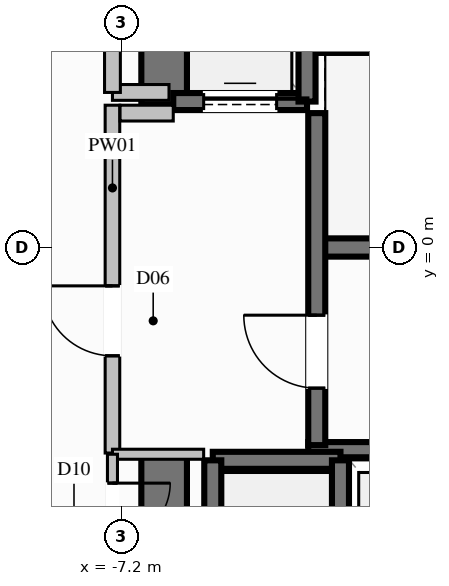
"""IFC4 building model, lengths in metres.
Left out: names, types, materials, properties, quantities, classifications, styles, units other than length and angle.
Written with IfcOpenShell. Run it as: python <this file> out.ifc"""

import sys

from ifc_helpers import new_model, si_unit, direction, frame, frame_2d, origin, place, context, subcontext, project, spatial, rectangle, extrude, element, fill, save


model = new_model("IFC4")
c1 = context("Model", 3, precision=1e-05, world=origin(), true_north=direction((0.0, 1.0)))
c2 = subcontext(c1, "Body", "Model", "MODEL_VIEW")
j1 = project(units=[si_unit("LENGTHUNIT", "METRE"), si_unit("PLANEANGLEUNIT", "RADIAN")], contexts=[c1])
p1 = place(None, origin())
s1 = spatial("IfcSite", under=j1, at=p1, CompositionType="ELEMENT")
p2 = place(p1, origin())
s2 = spatial("IfcBuilding", under=s1, at=p2, CompositionType="ELEMENT")
p3 = place(p2, frame((0.0, 0.0, 68.0)))
s3 = spatial("IfcBuildingStorey", under=s2, at=p3, CompositionType="ELEMENT", Elevation=68.0)
p4 = place(p3, frame((-3.99, 0.0, 0.0), z_axis=(0.0, 0.0, 1.0), x_axis=(1.0, 0.0, 0.0)))
e1 = element("IfcWall", 1, at=p4, inside=s3, PredefinedType="SHEAR", context=c2, shape_type="SweptSolid", body=[
    extrude(rectangle(XDim=7.98, YDim=0.3, at=frame_2d((3.99, 0.0))), origin(), (0.0, 0.0, 1.0), 3.6),
])
for number, where, z_axis, x_axis in (
    (2, (-4.13, -3.325, 0.0), (0.0, 0.0, 1.0), (1.0, 0.0, 0.0)),
    (3, (-4.13, 3.325, 0.0), (0.0, 0.0, 1.0), (1.0, 0.0, 0.0)),
):
    element("IfcWall", number, at=place(p3, frame(where, z_axis=z_axis, x_axis=x_axis)), inside=s3, PredefinedType="SOLIDWALL", context=c2, shape_type="SweptSolid", body=[
        extrude(rectangle(XDim=8.26, YDim=0.25, at=frame_2d((4.13, 0.0))), origin(), (0.0, 0.0, 1.0), 3.6),
    ])
p5 = place(p3, frame((-6.5, 2.35, 0.0), z_axis=(0.0, 0.0, 1.0), x_axis=(0.0, 1.0, 0.0)))
e4 = element("IfcWall", 4, at=p5, inside=s3, PredefinedType="SHEAR", context=c2, shape_type="SweptSolid", body=[
    extrude(rectangle(XDim=4.125, YDim=0.75, at=frame_2d((2.062, 0.0))), origin(), (0.0, 0.0, 1.0), 3.6),
])
p6 = place(p3, frame((-6.5, -6.475, 0.0), z_axis=(0.0, 0.0, 1.0), x_axis=(0.0, 1.0, 0.0)))
e5 = element("IfcWall", 5, at=p6, inside=s3, PredefinedType="SHEAR", context=c2, shape_type="SweptSolid", body=[
    extrude(rectangle(XDim=3.125, YDim=0.75, at=frame_2d((1.562, 0.0))), origin(), (0.0, 0.0, 1.0), 3.6),
])
p7 = place(p3, frame((-3.6, -3.5, 0.0), z_axis=(0.0, 0.0, 1.0), x_axis=(-1.0, 0.0, 0.0)))
e6 = element("IfcWall", 6, at=p7, inside=s3, PredefinedType="SOLIDWALL", context=c2, shape_type="SweptSolid", body=[
    extrude(rectangle(XDim=2.1, YDim=0.28, at=frame_2d((1.05, 0.0))), origin(), (0.0, 0.0, 1.0), 3.34),
])
for number, where, z_axis, x_axis in (
    (7, (-5.7, -3.5, 0.0), (0.0, 0.0, 1.0), (0.0, -1.0, 0.0)),
    (8, (-3.6, -6.0, 0.0), (0.0, 0.0, 1.0), (0.0, 1.0, 0.0)),
):
    element("IfcWall", number, at=place(p3, frame(where, z_axis=z_axis, x_axis=x_axis)), inside=s3, PredefinedType="SOLIDWALL", context=c2, shape_type="SweptSolid", body=[
        extrude(rectangle(XDim=2.5, YDim=0.28, at=frame_2d((1.25, 0.0))), origin(), (0.0, 0.0, 1.0), 3.34),
    ])
p8 = place(p3, frame((-6.35, 2.4, 0.0), z_axis=(0.0, 0.0, 1.0), x_axis=(1.0, 0.0, 0.0)))
e9 = element("IfcWall", 9, at=p8, inside=s3, PredefinedType="SOLIDWALL", context=c2, shape_type="SweptSolid", body=[
    extrude(rectangle(XDim=2.2, YDim=0.28, at=frame_2d((1.1, 0.0))), origin(), (0.0, 0.0, 1.0), 3.34),
])
p9 = place(p8, frame((0.5, 0.0, 0.0)))
e10 = element("IfcOpeningElement", 10, at=p9, cuts=e9, PredefinedType="OPENING", context=c2, shape_type="SweptSolid", body=[
    extrude(rectangle(XDim=1.2, YDim=2.2, at=frame_2d((0.6, 1.1))), frame((0.0, 0.15, 0.0), z_axis=(0.0, -1.0, 0.0), x_axis=(1.0, 0.0, 0.0)), (0.0, 0.0, 1.0), 0.3),
])
p10 = place(p3, frame((-4.15, 2.4, 0.0), z_axis=(0.0, 0.0, 1.0), x_axis=(0.0, 1.0, 0.0)))
e11 = element("IfcWall", 11, at=p10, inside=s3, PredefinedType="SOLIDWALL", context=c2, shape_type="SweptSolid", body=[
    extrude(rectangle(XDim=2.7, YDim=0.28, at=frame_2d((1.35, 0.0))), origin(), (0.0, 0.0, 1.0), 3.34),
])
p11 = place(p3, frame((-3.99, -3.25, 0.0), z_axis=(0.0, 0.0, 1.0), x_axis=(0.0, 1.0, 0.0)))
e12 = element("IfcWall", 12, at=p11, inside=s3, PredefinedType="SOLIDWALL", context=c2, shape_type="SweptSolid", body=[
    extrude(rectangle(XDim=5.46, YDim=0.28, at=frame_2d((2.73, 0.0))), origin(), (0.0, 0.0, 1.0), 3.34),
])
p12 = place(p11, frame((0.937, 0.0, 0.0)))
e13 = element("IfcOpeningElement", 13, at=p12, cuts=e12, PredefinedType="OPENING", context=c2, shape_type="SweptSolid", body=[
    extrude(rectangle(XDim=1.2, YDim=2.2, at=frame_2d((0.6, 1.1))), frame((0.0, 0.15, 0.0), z_axis=(0.0, -1.0, 0.0), x_axis=(1.0, 0.0, 0.0)), (0.0, 0.0, 1.0), 0.3),
])
p13 = place(p3, frame((-7.35, -3.38, 0.0), z_axis=(0.0, 0.0, 1.0), x_axis=(0.0, 1.0, 0.0)))
e14 = element("IfcWall", 14, at=p13, inside=s3, PredefinedType="PARTITIONING", context=c2, shape_type="SweptSolid", body=[
    extrude(rectangle(XDim=5.72, YDim=0.24, at=frame_2d((2.86, 0.0))), origin(), (0.0, 0.0, 1.0), 2.425),
])
p14 = place(p13, frame((1.599, 0.0, 0.0)))
e15 = element("IfcOpeningElement", 15, at=p14, cuts=e14, PredefinedType="OPENING", context=c2, shape_type="SweptSolid", body=[
    extrude(rectangle(XDim=1.15, YDim=2.2, at=frame_2d((0.575, 1.1))), frame((0.0, 0.13, 0.0), z_axis=(0.0, -1.0, 0.0), x_axis=(1.0, 0.0, 0.0)), (0.0, 0.0, 1.0), 0.26),
])
p15 = place(p3, frame((-7.225, 2.21, 0.0), z_axis=(0.0, 0.0, 1.0), x_axis=(1.0, 0.0, 0.0)))
e16 = element("IfcWall", 16, at=p15, inside=s3, PredefinedType="PARTITIONING", context=c2, shape_type="SweptSolid", body=[
    extrude(rectangle(XDim=0.875, YDim=0.26, at=frame_2d((0.438, 0.0))), origin(), (0.0, 0.0, 1.0), 3.34),
])
p16 = place(p3, frame((-7.35, 2.55, 0.0), z_axis=(0.0, 0.0, 1.0), x_axis=(1.0, 0.0, 0.0)))
e17 = element("IfcWall", 17, at=p16, inside=s3, PredefinedType="PARTITIONING", context=c2, shape_type="SweptSolid", body=[
    extrude(rectangle(XDim=0.93, YDim=0.26, at=frame_2d((0.465, 0.0))), origin(), (0.0, 0.0, 1.0), 3.34),
])
p17 = place(p3, frame((-7.35, 2.55, 0.0), z_axis=(0.0, 0.0, 1.0), x_axis=(0.0, 1.0, 0.0)))
e18 = element("IfcWall", 18, at=p17, inside=s3, PredefinedType="PARTITIONING", context=c2, shape_type="SweptSolid", body=[
    extrude(rectangle(XDim=2.4, YDim=0.26, at=frame_2d((1.2, 0.0))), origin(), (0.0, 0.0, 1.0), 2.425),
])
p18 = place(p17, frame((0.775, 0.0, 0.0)))
e19 = element("IfcOpeningElement", 19, at=p18, cuts=e18, PredefinedType="OPENING", context=c2, shape_type="SweptSolid", body=[
    extrude(rectangle(XDim=0.85, YDim=2.05, at=frame_2d((0.425, 1.025))), frame((0.0, 0.14, 0.0), z_axis=(0.0, -1.0, 0.0), x_axis=(1.0, 0.0, 0.0)), (0.0, 0.0, 1.0), 0.28),
])
p19 = place(p3, frame((-5.85, -3.4, 0.0), z_axis=(0.0, 0.0, 1.0), x_axis=(-1.0, 0.0, 0.0)))
e20 = element("IfcWall", 20, at=p19, inside=s3, PredefinedType="PARTITIONING", context=c2, shape_type="SweptSolid", body=[
    extrude(rectangle(XDim=1.5, YDim=0.165, at=frame_2d((0.75, 0.0))), origin(), (0.0, 0.0, 1.0), 3.34),
])
p20 = place(p3, frame((-7.35, -3.4, 0.0), z_axis=(0.0, 0.0, 1.0), x_axis=(0.0, -1.0, 0.0)))
e21 = element("IfcWall", 21, at=p20, inside=s3, PredefinedType="PARTITIONING", context=c2, shape_type="SweptSolid", body=[
    extrude(rectangle(XDim=1.9, YDim=0.165, at=frame_2d((0.95, 0.0))), origin(), (0.0, 0.0, 1.0), 3.34),
])
p21 = place(p20, frame((0.475, 0.0, 0.0)))
e22 = element("IfcOpeningElement", 22, at=p21, cuts=e21, PredefinedType="OPENING", context=c2, shape_type="SweptSolid", body=[
    extrude(rectangle(XDim=0.95, YDim=2.1, at=frame_2d((0.475, 1.05))), frame((0.0, 0.093, 0.0), z_axis=(0.0, -1.0, 0.0), x_axis=(1.0, 0.0, 0.0)), (0.0, 0.0, 1.0), 0.185),
])
p22 = place(p9, origin())
e23 = element("IfcDoor", 23, at=p22, inside=s3, OperationType="SLIDING_TO_LEFT", PredefinedType="DOOR", context=c2, shape_type="SweptSolid", body=[
    extrude(rectangle(XDim=1.2, YDim=2.2, at=frame_2d((0.6, 1.1))), frame((0.0, 0.025, 0.0), z_axis=(0.0, -1.0, 0.0), x_axis=(1.0, 0.0, 0.0)), (0.0, 0.0, 1.0), 0.05),
])
fill(e10, e23)
p23 = place(p12, origin())
e24 = element("IfcDoor", 24, at=p23, inside=s3, OperationType="SINGLE_SWING_RIGHT", PredefinedType="DOOR", context=c2, shape_type="SweptSolid", body=[
    extrude(rectangle(XDim=1.2, YDim=2.2, at=frame_2d((0.6, 1.1))), frame((0.0, 0.025, 0.0), z_axis=(0.0, -1.0, 0.0), x_axis=(1.0, 0.0, 0.0)), (0.0, 0.0, 1.0), 0.05),
])
fill(e13, e24)
p24 = place(p14, origin())
e25 = element("IfcDoor", 25, at=p24, inside=s3, OperationType="SINGLE_SWING_RIGHT", PredefinedType="DOOR", context=c2, shape_type="SweptSolid", body=[
    extrude(rectangle(XDim=1.15, YDim=2.2, at=frame_2d((0.575, 1.1))), frame((0.0, 0.025, 0.0), z_axis=(0.0, -1.0, 0.0), x_axis=(1.0, 0.0, 0.0)), (0.0, 0.0, 1.0), 0.05),
])
fill(e15, e25)
p25 = place(p21, origin())
e26 = element("IfcDoor", 26, at=p25, inside=s3, OperationType="SINGLE_SWING_LEFT", PredefinedType="DOOR", context=c2, shape_type="SweptSolid", body=[
    extrude(rectangle(XDim=0.95, YDim=2.1, at=frame_2d((0.475, 1.05))), frame((0.0, 0.025, 0.0), z_axis=(0.0, -1.0, 0.0), x_axis=(1.0, 0.0, 0.0)), (0.0, 0.0, 1.0), 0.05),
])
fill(e22, e26)
save(model, sys.argv[1])
